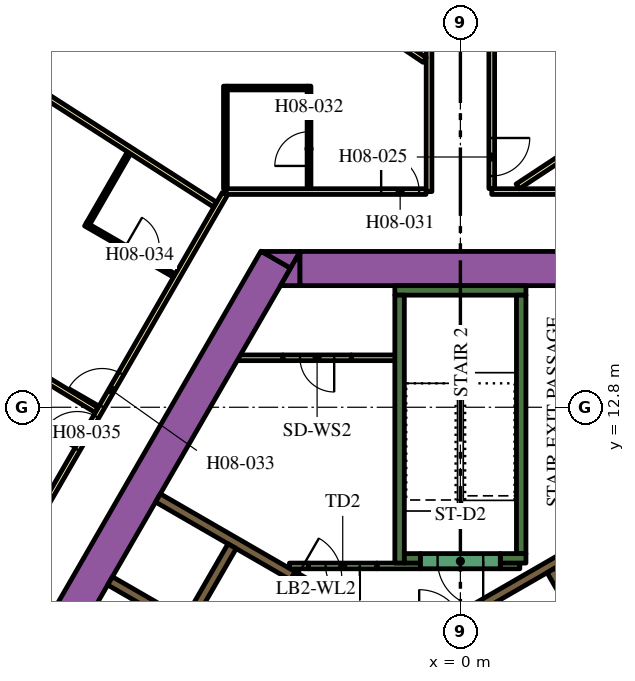
"""IFC4 building model, lengths in metres.
Left out: names, types, materials, properties, quantities, classifications, styles, units other than length and angle.
Written with IfcOpenShell. Run it as: python <this file> out.ifc"""

import sys

from ifc_helpers import new_model, si_unit, direction, frame, frame_2d, origin, place, context, subcontext, project, spatial, polyline, rectangle, outline, extrude, element, fill, save


model = new_model("IFC4")
c1 = context("Model", 3, precision=1e-05, world=origin(), true_north=direction((0.0, 1.0)))
c2 = subcontext(c1, "Body", "Model", "MODEL_VIEW")
j1 = project(units=[si_unit("LENGTHUNIT", "METRE"), si_unit("PLANEANGLEUNIT", "RADIAN")], contexts=[c1])
p1 = place(None, origin())
s1 = spatial("IfcSite", under=j1, at=p1, CompositionType="ELEMENT")
p2 = place(p1, origin())
s2 = spatial("IfcBuilding", under=s1, at=p2, CompositionType="ELEMENT")
p3 = place(p2, frame((0.0, 0.0, 107.1)))
s3 = spatial("IfcBuildingStorey", under=s2, at=p3, CompositionType="ELEMENT", Elevation=107.1)
p4 = place(p3, frame((-15.36, -1.503, 0.0), z_axis=(0.0, 0.0, 1.0), x_axis=(0.50000389221, 0.866023156604, 0.0)))
e1 = element("IfcWall", 1, at=p4, inside=s3, PredefinedType="SOLIDWALL", context=c2, shape_type="SweptSolid", body=[
    extrude(rectangle(XDim=21.0, YDim=0.9, at=frame_2d((10.5, 0.0))), origin(), (0.0, 0.0, 1.0), 3.9),
])
p5 = place(p3, origin())
e2 = element("IfcWall", 2, at=p5, inside=s3, PredefinedType="SOLIDWALL", context=c2, shape_type="SweptSolid", body=[
    extrude(outline(polyline([(-4.215, 16.9), (-4.469, 16.46), (-5.231, 16.9), (-4.215, 16.9)])), origin(), (0.0, 0.0, 1.0), 3.9),
])
p6 = place(p3, frame((-4.224, 16.45, 0.0), z_axis=(0.0, 0.0, 1.0), x_axis=(1.0, 0.0, 0.0)))
e3 = element("IfcWall", 3, at=p6, inside=s3, PredefinedType="SOLIDWALL", context=c2, shape_type="SweptSolid", body=[
    extrude(rectangle(XDim=9.488, YDim=0.9, at=frame_2d((4.744, 0.0))), origin(), (0.0, 0.0, 1.0), 3.9),
])
e4 = element("IfcWall", 4, at=p5, inside=s3, PredefinedType="SOLIDWALL", context=c2, shape_type="SweptSolid", body=[
    extrude(outline(polyline([(-4.734, 16.0), (-4.226, 16.88), (-4.226, 16.0), (-4.734, 16.0)])), origin(), (0.0, 0.0, 1.0), 3.9),
])
p7 = place(p3, frame((-1.725, 15.875, 0.0), z_axis=(0.0, 0.0, 1.0), x_axis=(1.0, 0.0, 0.0)))
e5 = element("IfcWall", 5, at=p7, inside=s3, PredefinedType="SOLIDWALL", context=c2, shape_type="SweptSolid", body=[
    extrude(rectangle(XDim=3.45, YDim=0.25, at=frame_2d((1.725, 0.0))), origin(), (0.0, 0.0, 1.0), 3.9),
])
p8 = place(p3, frame((1.6, 8.95, 0.0), z_axis=(0.0, 0.0, 1.0), x_axis=(0.0, 1.0, 0.0)))
e6 = element("IfcWall", 6, at=p8, inside=s3, PredefinedType="SOLIDWALL", context=c2, shape_type="SweptSolid", body=[
    extrude(rectangle(XDim=6.8, YDim=0.25, at=frame_2d((3.4, 0.0))), origin(), (0.0, 0.0, 1.0), 3.9),
])
p9 = place(p3, frame((1.05, 8.825, 0.0), z_axis=(0.0, 0.0, 1.0), x_axis=(1.0, 0.0, 0.0)))
e7 = element("IfcWall", 7, at=p9, inside=s3, PredefinedType="SOLIDWALL", context=c2, shape_type="SweptSolid", body=[
    extrude(rectangle(XDim=0.675, YDim=0.25, at=frame_2d((0.337, 0.0))), origin(), (0.0, 0.0, 1.0), 3.9),
])
p10 = place(p3, frame((-1.6, 8.7, 0.0), z_axis=(0.0, 0.0, 1.0), x_axis=(0.0, 1.0, 0.0)))
e8 = element("IfcWall", 8, at=p10, inside=s3, PredefinedType="SOLIDWALL", context=c2, shape_type="SweptSolid", body=[
    extrude(rectangle(XDim=7.05, YDim=0.25, at=frame_2d((3.525, 0.0))), origin(), (0.0, 0.0, 1.0), 3.9),
])
p11 = place(p3, frame((-1.475, 8.825, 0.0), z_axis=(0.0, 0.0, 1.0), x_axis=(1.0, 0.0, 0.0)))
e9 = element("IfcWall", 9, at=p11, inside=s3, PredefinedType="SOLIDWALL", context=c2, shape_type="SweptSolid", body=[
    extrude(rectangle(XDim=0.425, YDim=0.25, at=frame_2d((0.212, 0.0))), origin(), (0.0, 0.0, 1.0), 3.9),
])
p12 = place(p3, frame((0.314, 7.456, 0.0), z_axis=(0.0, 0.0, 1.0), x_axis=(0.866013897511, 0.50001992892, 0.0)))
e10 = element("IfcWall", 10, at=p12, inside=s3, PredefinedType="SOLIDWALL", context=c2, shape_type="SweptSolid", body=[
    extrude(rectangle(XDim=3.268, YDim=0.25, at=frame_2d((1.634, 0.0))), origin(), (0.0, 0.0, 1.0), 3.9),
])
e11 = element("IfcWall", 11, at=p5, inside=s3, PredefinedType="SOLIDWALL", context=c2, shape_type="SweptSolid", body=[
    extrude(outline(polyline([(-3.128, 7.481), (-3.259, 7.557), (-3.134, 7.773), (-3.003, 7.698), (-3.128, 7.481)])), origin(), (0.0, 0.0, 1.0), 3.9),
])
p13 = place(p3, frame((-7.314, 7.132, 0.0), z_axis=(0.0, 0.0, 1.0), x_axis=(-0.866008176907, 0.50002983664, 0.0)))
e12 = element("IfcWall", 12, at=p13, inside=s3, PredefinedType="SOLIDWALL", context=c2, shape_type="SweptSolid", body=[
    extrude(rectangle(XDim=2.2, YDim=0.25, at=frame_2d((1.1, 0.0))), origin(), (0.0, 0.0, 1.0), 3.9),
])
p14 = place(p3, frame((-7.959, 10.415, 0.0), z_axis=(0.0, 0.0, 1.0), x_axis=(0.866020958405, -0.500007699544, 0.0)))
e13 = element("IfcWall", 13, at=p14, inside=s3, PredefinedType="SOLIDWALL", context=c2, shape_type="SweptSolid", body=[
    extrude(rectangle(XDim=4.1, YDim=0.25, at=frame_2d((2.05, 0.0))), origin(), (0.0, 0.0, 1.0), 3.9),
])
p15 = place(p3, frame((-3.997, 8.625, 0.0), z_axis=(0.0, 0.0, 1.0), x_axis=(-1.0, 0.0, 0.0)))
e14 = element("IfcWall", 14, at=p15, inside=s3, PredefinedType="PARTITIONING", context=c2, shape_type="SweptSolid", body=[
    extrude(rectangle(XDim=0.502, YDim=0.15, at=frame_2d((0.251, 0.0))), origin(), (0.0, 0.0, 1.0), 2.75),
])
p16 = place(p3, frame((-2.196, 8.625, 0.0), z_axis=(0.0, 0.0, 1.0), x_axis=(1.0, 0.0, 0.0)))
e15 = element("IfcWall", 15, at=p16, inside=s3, PredefinedType="PARTITIONING", context=c2, shape_type="SweptSolid", body=[
    extrude(rectangle(XDim=1.146, YDim=0.15, at=frame_2d((0.573, 0.0))), origin(), (0.0, 0.0, 1.0), 2.75),
])
p17 = place(p3, frame((-5.851, 14.102, 0.0), z_axis=(0.0, 0.0, 1.0), x_axis=(1.0, 0.0, 0.0)))
e16 = element("IfcWall", 16, at=p17, inside=s3, PredefinedType="PARTITIONING", context=c2, shape_type="SweptSolid", body=[
    extrude(rectangle(XDim=1.18, YDim=0.15, at=frame_2d((0.59, 0.0))), origin(), (0.0, 0.0, 1.0), 2.75),
])
p18 = place(p3, frame((-2.871, 14.102, 0.0), z_axis=(0.0, 0.0, 1.0), x_axis=(1.0, 0.0, 0.0)))
e17 = element("IfcWall", 17, at=p18, inside=s3, PredefinedType="PARTITIONING", context=c2, shape_type="SweptSolid", body=[
    extrude(rectangle(XDim=1.196, YDim=0.15, at=frame_2d((0.598, 0.0))), origin(), (0.0, 0.0, 1.0), 2.75),
])
p19 = place(p3, frame((1.05, 8.625, 0.0), z_axis=(0.0, 0.0, 1.0), x_axis=(1.0, 0.0, 0.0)))
e18 = element("IfcWall", 18, at=p19, inside=s3, PredefinedType="PARTITIONING", context=c2, shape_type="SweptSolid", body=[
    extrude(rectangle(XDim=0.514, YDim=0.15, at=frame_2d((0.257, 0.0))), origin(), (0.0, 0.0, 1.0), 2.75),
])
p20 = place(p3, frame((8.565, -2.185, 0.0), z_axis=(0.0, 0.0, 1.0), x_axis=(-0.499997954832, 0.866026584559, 0.0)))
e19 = element("IfcWall", 19, at=p20, inside=s3, PredefinedType="SOLIDWALL", context=c2, shape_type="SweptSolid", body=[
    extrude(rectangle(XDim=12.35, YDim=0.25, at=frame_2d((6.175, 0.0))), origin(), (0.0, 0.0, 1.0), 3.9),
])
p21 = place(p20, frame((5.725, 0.0, 0.0)))
e20 = element("IfcOpeningElement", 20, at=p21, cuts=e19, PredefinedType="OPENING", context=c2, shape_type="SweptSolid", body=[
    extrude(rectangle(XDim=0.9, YDim=2.1, at=frame_2d((0.45, 1.05))), frame((0.0, 0.135, 0.0), z_axis=(0.0, -1.0, 0.0), x_axis=(1.0, 0.0, 0.0)), (0.0, 0.0, 1.0), 0.27),
])
p22 = place(p3, frame((-6.008, 9.144, 0.0), z_axis=(0.0, 0.0, 1.0), x_axis=(-0.500006956611, -0.866021387346, 0.0)))
e21 = element("IfcWall", 21, at=p22, inside=s3, PredefinedType="SOLIDWALL", context=c2, shape_type="SweptSolid", body=[
    extrude(rectangle(XDim=9.83, YDim=0.25, at=frame_2d((4.915, 0.0))), origin(), (0.0, 0.0, 1.0), 3.9),
])
p23 = place(p22, frame((6.985, 0.0, 0.0)))
e22 = element("IfcOpeningElement", 22, at=p23, cuts=e21, PredefinedType="OPENING", context=c2, shape_type="SweptSolid", body=[
    extrude(rectangle(XDim=0.9, YDim=2.1, at=frame_2d((0.45, 1.05))), frame((0.0, 0.135, 0.0), z_axis=(0.0, -1.0, 0.0), x_axis=(1.0, 0.0, 0.0)), (0.0, 0.0, 1.0), 0.27),
])
p24 = place(p3, frame((1.05, 8.75, 0.0), z_axis=(0.0, 0.0, 1.0), x_axis=(-1.0, 0.0, 0.0)))
e23 = element("IfcWall", 23, at=p24, inside=s3, PredefinedType="SOLIDWALL", context=c2, shape_type="SweptSolid", body=[
    extrude(rectangle(XDim=2.1, YDim=0.4, at=frame_2d((1.05, 0.0))), origin(), (0.0, 0.0, 1.0), 3.9),
])
p25 = place(p24, frame((0.45, 0.0, 0.0)))
e24 = element("IfcOpeningElement", 24, at=p25, cuts=e23, PredefinedType="OPENING", context=c2, shape_type="SweptSolid", body=[
    extrude(rectangle(XDim=1.2, YDim=2.1, at=frame_2d((0.6, 1.05))), frame((0.0, 0.21, 0.0), z_axis=(0.0, -1.0, 0.0), x_axis=(1.0, 0.0, 0.0)), (0.0, 0.0, 1.0), 0.42),
])
p26 = place(p3, frame((-2.196, 8.625, 0.0), z_axis=(0.0, 0.0, 1.0), x_axis=(-1.0, 0.0, 0.0)))
e25 = element("IfcWall", 25, at=p26, inside=s3, PredefinedType="PARTITIONING", context=c2, shape_type="SweptSolid", body=[
    extrude(rectangle(XDim=1.8, YDim=0.15, at=frame_2d((0.9, 0.0))), origin(), (0.0, 0.0, 1.0), 2.75),
])
p27 = place(p26, frame((0.45, 0.0, 0.0)))
e26 = element("IfcOpeningElement", 26, at=p27, cuts=e25, PredefinedType="OPENING", context=c2, shape_type="SweptSolid", body=[
    extrude(rectangle(XDim=0.9, YDim=2.1, at=frame_2d((0.45, 1.05))), frame((0.0, 0.085, 0.0), z_axis=(0.0, -1.0, 0.0), x_axis=(1.0, 0.0, 0.0)), (0.0, 0.0, 1.0), 0.17),
])
p28 = place(p3, frame((-4.409, 8.365, 0.0), z_axis=(0.0, 0.0, 1.0), x_axis=(0.866034573852, -0.49998411664, 0.0)))
e27 = element("IfcWall", 27, at=p28, inside=s3, PredefinedType="SOLIDWALL", context=c2, shape_type="SweptSolid", body=[
    extrude(rectangle(XDim=1.4, YDim=0.25, at=frame_2d((0.7, 0.0))), origin(), (0.0, 0.0, 1.0), 3.9),
])
p29 = place(p28, frame((0.1, 0.0, 0.0)))
e28 = element("IfcOpeningElement", 28, at=p29, cuts=e27, PredefinedType="OPENING", context=c2, shape_type="SweptSolid", body=[
    extrude(rectangle(XDim=1.2, YDim=2.1, at=frame_2d((0.6, 1.05))), frame((0.0, 0.135, 0.0), z_axis=(0.0, -1.0, 0.0), x_axis=(1.0, 0.0, 0.0)), (0.0, 0.0, 1.0), 0.27),
])
p30 = place(p3, frame((-2.871, 14.102, 0.0), z_axis=(0.0, 0.0, 1.0), x_axis=(-1.0, 0.0, 0.0)))
e29 = element("IfcWall", 29, at=p30, inside=s3, PredefinedType="PARTITIONING", context=c2, shape_type="SweptSolid", body=[
    extrude(rectangle(XDim=1.8, YDim=0.15, at=frame_2d((0.9, 0.0))), origin(), (0.0, 0.0, 1.0), 2.75),
])
p31 = place(p30, frame((0.45, 0.0, 0.0)))
e30 = element("IfcOpeningElement", 30, at=p31, cuts=e29, PredefinedType="OPENING", context=c2, shape_type="SweptSolid", body=[
    extrude(rectangle(XDim=0.9, YDim=2.1, at=frame_2d((0.45, 1.05))), frame((0.0, 0.085, 0.0), z_axis=(0.0, -1.0, 0.0), x_axis=(1.0, 0.0, 0.0)), (0.0, 0.0, 1.0), 0.17),
])
p32 = place(p3, frame((0.825, 18.475, 0.0), z_axis=(0.0, 0.0, 1.0), x_axis=(1.0, 0.0, 0.0)))
e31 = element("IfcWall", 31, at=p32, inside=s3, PredefinedType="PARTITIONING", context=c2, shape_type="SweptSolid", body=[
    extrude(rectangle(XDim=5.268, YDim=0.15, at=frame_2d((2.634, 0.0))), origin(), (0.0, 0.0, 1.0), 2.75),
])
p33 = place(p3, frame((0.825, 32.098, 0.0), z_axis=(0.0, 0.0, 1.0), x_axis=(0.0, -1.0, 0.0)))
e32 = element("IfcWall", 32, at=p33, inside=s3, PredefinedType="PARTITIONING", context=c2, shape_type="SweptSolid", body=[
    extrude(rectangle(XDim=13.543, YDim=0.15, at=frame_2d((6.772, 0.0))), origin(), (0.0, 0.0, 1.0), 2.75),
])
p34 = place(p33, frame((12.213, 0.0, 0.0)))
e33 = element("IfcOpeningElement", 33, at=p34, cuts=e32, PredefinedType="OPENING", context=c2, shape_type="SweptSolid", body=[
    extrude(rectangle(XDim=1.0, YDim=2.1, at=frame_2d((0.5, 1.05))), frame((0.0, 0.085, 0.0), z_axis=(0.0, -1.0, 0.0), x_axis=(1.0, 0.0, 0.0)), (0.0, 0.0, 1.0), 0.17),
])
p35 = place(p33, frame((4.65, 0.0, 0.0)))
e34 = element("IfcOpeningElement", 34, at=p35, cuts=e32, PredefinedType="OPENING", context=c2, shape_type="SweptSolid", body=[
    extrude(rectangle(XDim=1.0, YDim=2.1, at=frame_2d((0.5, 1.05))), frame((0.0, 0.085, 0.0), z_axis=(0.0, -1.0, 0.0), x_axis=(1.0, 0.0, 0.0)), (0.0, 0.0, 1.0), 0.17),
])
p36 = place(p3, frame((-0.825, 18.475, 0.0), z_axis=(0.0, 0.0, 1.0), x_axis=(0.0, 1.0, 0.0)))
e35 = element("IfcWall", 35, at=p36, inside=s3, PredefinedType="PARTITIONING", context=c2, shape_type="SweptSolid", body=[
    extrude(rectangle(XDim=13.623, YDim=0.15, at=frame_2d((6.812, 0.0))), origin(), (0.0, 0.0, 1.0), 2.75),
])
p37 = place(p36, frame((4.135, 0.0, 0.0)))
e36 = element("IfcOpeningElement", 36, at=p37, cuts=e35, PredefinedType="OPENING", context=c2, shape_type="SweptSolid", body=[
    extrude(rectangle(XDim=1.1, YDim=2.1, at=frame_2d((0.55, 1.05))), frame((0.0, 0.085, 0.0), z_axis=(0.0, -1.0, 0.0), x_axis=(1.0, 0.0, 0.0)), (0.0, 0.0, 1.0), 0.17),
])
p38 = place(p3, frame((-6.163, 18.475, 0.0), z_axis=(0.0, 0.0, 1.0), x_axis=(1.0, 0.0, 0.0)))
e37 = element("IfcWall", 37, at=p38, inside=s3, PredefinedType="PARTITIONING", context=c2, shape_type="SweptSolid", body=[
    extrude(rectangle(XDim=5.258, YDim=0.15, at=frame_2d((2.629, 0.0))), origin(), (0.0, 0.0, 1.0), 2.75),
])
p39 = place(p38, frame((4.078, 0.0, 0.0)))
e38 = element("IfcOpeningElement", 38, at=p39, cuts=e37, PredefinedType="OPENING", context=c2, shape_type="SweptSolid", body=[
    extrude(rectangle(XDim=1.0, YDim=2.1, at=frame_2d((0.5, 1.05))), frame((0.0, 0.085, 0.0), z_axis=(0.0, -1.0, 0.0), x_axis=(1.0, 0.0, 0.0)), (0.0, 0.0, 1.0), 0.17),
])
p40 = place(p3, frame((-19.081, -3.9, 0.0), z_axis=(0.0, 0.0, 1.0), x_axis=(0.499998313975, 0.866026377209, 0.0)))
e39 = element("IfcWall", 39, at=p40, inside=s3, PredefinedType="PARTITIONING", context=c2, shape_type="SweptSolid", body=[
    extrude(rectangle(XDim=25.766, YDim=0.15, at=frame_2d((12.883, 0.0))), origin(), (0.0, 0.0, 1.0), 2.75),
])
p41 = place(p40, frame((19.306, 0.0, 0.0)))
e40 = element("IfcOpeningElement", 40, at=p41, cuts=e39, PredefinedType="OPENING", context=c2, shape_type="SweptSolid", body=[
    extrude(rectangle(XDim=1.0, YDim=2.1, at=frame_2d((0.5, 1.05))), frame((0.0, 0.085, 0.0), z_axis=(0.0, -1.0, 0.0), x_axis=(1.0, 0.0, 0.0)), (0.0, 0.0, 1.0), 0.17),
])
p42 = place(p40, frame((18.0, 0.0, 0.0)))
e41 = element("IfcOpeningElement", 41, at=p42, cuts=e39, PredefinedType="OPENING", context=c2, shape_type="SweptSolid", body=[
    extrude(rectangle(XDim=1.0, YDim=2.1, at=frame_2d((0.5, 1.05))), frame((0.0, 0.085, 0.0), z_axis=(0.0, -1.0, 0.0), x_axis=(1.0, 0.0, 0.0)), (0.0, 0.0, 1.0), 0.17),
])
p43 = place(p40, frame((6.838, 0.0, 0.0)))
e42 = element("IfcOpeningElement", 42, at=p43, cuts=e39, PredefinedType="OPENING", context=c2, shape_type="SweptSolid", body=[
    extrude(rectangle(XDim=1.0, YDim=2.1, at=frame_2d((0.5, 1.05))), frame((0.0, 0.085, 0.0), z_axis=(0.0, -1.0, 0.0), x_axis=(1.0, 0.0, 0.0)), (0.0, 0.0, 1.0), 0.17),
])
p44 = place(p40, frame((4.674, 0.0, 0.0)))
e43 = element("IfcOpeningElement", 43, at=p44, cuts=e39, PredefinedType="OPENING", context=c2, shape_type="SweptSolid", body=[
    extrude(rectangle(XDim=0.9, YDim=2.1, at=frame_2d((0.45, 1.05))), frame((0.0, 0.085, 0.0), z_axis=(0.0, -1.0, 0.0), x_axis=(1.0, 0.0, 0.0)), (0.0, 0.0, 1.0), 0.17),
])
p45 = place(p40, frame((0.18, 0.0, 0.0)))
e44 = element("IfcOpeningElement", 44, at=p45, cuts=e39, PredefinedType="OPENING", context=c2, shape_type="SweptSolid", body=[
    extrude(rectangle(XDim=1.0, YDim=2.1, at=frame_2d((0.5, 1.05))), frame((0.0, 0.085, 0.0), z_axis=(0.0, -1.0, 0.0), x_axis=(1.0, 0.0, 0.0)), (0.0, 0.0, 1.0), 0.17),
])
p46 = place(p3, frame((-15.225, 16.167, 0.0), z_axis=(0.0, 0.0, 1.0), x_axis=(0.854088713274, -0.520127359266, 0.0)))
e45 = element("IfcWall", 45, at=p46, inside=s3, PredefinedType="PARTITIONING", context=c2, shape_type="SweptSolid", body=[
    extrude(rectangle(XDim=6.611, YDim=0.15, at=frame_2d((3.305, 0.0))), origin(), (0.0, 0.0, 1.0), 2.75),
])
p47 = place(p3, frame((-11.838, 21.585, 0.0), z_axis=(0.0, 0.0, 1.0), x_axis=(0.841699322813, -0.539946525108, 0.0)))
e46 = element("IfcWall", 46, at=p47, inside=s3, PredefinedType="PARTITIONING", context=c2, shape_type="SweptSolid", body=[
    extrude(rectangle(XDim=6.392, YDim=0.15, at=frame_2d((3.196, 0.0))), origin(), (0.0, 0.0, 1.0), 2.75),
])
p48 = place(p3, frame((-8.326, 26.923, 0.0), z_axis=(0.0, 0.0, 1.0), x_axis=(0.828836601893, -0.5594907393, 0.0)))
e47 = element("IfcWall", 47, at=p48, inside=s3, PredefinedType="PARTITIONING", context=c2, shape_type="SweptSolid", body=[
    extrude(rectangle(XDim=8.909, YDim=0.15, at=frame_2d((4.455, 0.0))), origin(), (0.0, 0.0, 1.0), 2.75),
])
p49 = place(p3, frame((10.592, 24.589, 0.0), z_axis=(0.0, 0.0, 1.0), x_axis=(-0.835337323748, -0.549737715236, 0.0)))
e48 = element("IfcWall", 48, at=p49, inside=s3, PredefinedType="PARTITIONING", context=c2, shape_type="SweptSolid", body=[
    extrude(rectangle(XDim=10.875, YDim=0.15, at=frame_2d((5.438, 0.0))), origin(), (0.0, 0.0, 1.0), 2.75),
])
p50 = place(p3, frame((-3.983, 18.55, 0.0), z_axis=(0.0, 0.0, 1.0), x_axis=(0.0, 1.0, 0.0)))
e49 = element("IfcWall", 49, at=p50, inside=s3, PredefinedType="PARTITIONING", context=c2, shape_type="SweptSolid", body=[
    extrude(rectangle(XDim=2.7, YDim=0.1, at=frame_2d((1.35, 0.0))), origin(), (0.0, 0.0, 1.0), 2.75),
])
p51 = place(p50, frame((0.6, 0.0, 0.0)))
e50 = element("IfcOpeningElement", 50, at=p51, cuts=e49, PredefinedType="OPENING", context=c2, shape_type="SweptSolid", body=[
    extrude(rectangle(XDim=0.9, YDim=2.1, at=frame_2d((0.45, 1.05))), frame((0.0, 0.06, 0.0), z_axis=(0.0, -1.0, 0.0), x_axis=(1.0, 0.0, 0.0)), (0.0, 0.0, 1.0), 0.12),
])
p52 = place(p3, frame((-4.033, 21.2, 0.0), z_axis=(0.0, 0.0, 1.0), x_axis=(-1.0, 0.0, 0.0)))
e51 = element("IfcWall", 51, at=p52, inside=s3, PredefinedType="PARTITIONING", context=c2, shape_type="SweptSolid", body=[
    extrude(rectangle(XDim=2.1, YDim=0.1, at=frame_2d((1.05, 0.0))), origin(), (0.0, 0.0, 1.0), 2.75),
])
p53 = place(p3, frame((-6.183, 18.55, 0.0), z_axis=(0.0, 0.0, 1.0), x_axis=(0.0, 1.0, 0.0)))
e52 = element("IfcWall", 52, at=p53, inside=s3, PredefinedType="PARTITIONING", context=c2, shape_type="SweptSolid", body=[
    extrude(rectangle(XDim=2.7, YDim=0.1, at=frame_2d((1.35, 0.0))), origin(), (0.0, 0.0, 1.0), 2.75),
])
p54 = place(p3, frame((-9.864, 17.615, 0.0), z_axis=(0.0, 0.0, 1.0), x_axis=(0.866019956843, -0.50000943426, 0.0)))
e53 = element("IfcWall", 53, at=p54, inside=s3, PredefinedType="PARTITIONING", context=c2, shape_type="SweptSolid", body=[
    extrude(rectangle(XDim=2.7, YDim=0.1, at=frame_2d((1.35, 0.0))), origin(), (0.0, 0.0, 1.0), 2.75),
])
p55 = place(p54, frame((1.2, 0.0, 0.0)))
e54 = element("IfcOpeningElement", 54, at=p55, cuts=e53, PredefinedType="OPENING", context=c2, shape_type="SweptSolid", body=[
    extrude(rectangle(XDim=0.9, YDim=2.1, at=frame_2d((0.45, 1.05))), frame((0.0, 0.06, 0.0), z_axis=(0.0, -1.0, 0.0), x_axis=(1.0, 0.0, 0.0)), (0.0, 0.0, 1.0), 0.12),
])
p56 = place(p3, frame((-9.796, 17.633, 0.0), z_axis=(0.0, 0.0, 1.0), x_axis=(0.499961633463, 0.866047553582, 0.0)))
e55 = element("IfcWall", 55, at=p56, inside=s3, PredefinedType="PARTITIONING", context=c2, shape_type="SweptSolid", body=[
    extrude(rectangle(XDim=2.15, YDim=0.1, at=frame_2d((1.075, 0.0))), origin(), (0.0, 0.0, 1.0), 2.75),
])
p57 = place(p25, origin())
e56 = element("IfcDoor", 56, at=p57, inside=s3, OperationType="SINGLE_SWING_LEFT", PredefinedType="DOOR", context=c2, shape_type="SweptSolid", body=[
    extrude(rectangle(XDim=1.2, YDim=2.1, at=frame_2d((0.6, 1.05))), frame((0.0, 0.025, 0.0), z_axis=(0.0, -1.0, 0.0), x_axis=(1.0, 0.0, 0.0)), (0.0, 0.0, 1.0), 0.05),
])
fill(e24, e56)
p58 = place(p27, origin())
e57 = element("IfcDoor", 57, at=p58, inside=s3, OperationType="SINGLE_SWING_LEFT", PredefinedType="DOOR", context=c2, shape_type="SweptSolid", body=[
    extrude(rectangle(XDim=0.9, YDim=2.1, at=frame_2d((0.45, 1.05))), frame((0.0, 0.025, 0.0), z_axis=(0.0, -1.0, 0.0), x_axis=(1.0, 0.0, 0.0)), (0.0, 0.0, 1.0), 0.05),
])
fill(e26, e57)
p59 = place(p29, origin())
e58 = element("IfcDoor", 58, at=p59, inside=s3, OperationType="SINGLE_SWING_LEFT", PredefinedType="DOOR", context=c2, shape_type="SweptSolid", body=[
    extrude(rectangle(XDim=1.2, YDim=2.1, at=frame_2d((0.6, 1.05))), frame((0.0, 0.025, 0.0), z_axis=(0.0, -1.0, 0.0), x_axis=(1.0, 0.0, 0.0)), (0.0, 0.0, 1.0), 0.05),
])
fill(e28, e58)
p60 = place(p31, origin())
e59 = element("IfcDoor", 59, at=p60, inside=s3, OperationType="SINGLE_SWING_LEFT", PredefinedType="DOOR", context=c2, shape_type="SweptSolid", body=[
    extrude(rectangle(XDim=0.9, YDim=2.1, at=frame_2d((0.45, 1.05))), frame((0.0, 0.025, 0.0), z_axis=(0.0, -1.0, 0.0), x_axis=(1.0, 0.0, 0.0)), (0.0, 0.0, 1.0), 0.05),
])
fill(e30, e59)
p61 = place(p34, origin())
e60 = element("IfcDoor", 60, at=p61, inside=s3, OperationType="SINGLE_SWING_RIGHT", PredefinedType="DOOR", context=c2, shape_type="SweptSolid", body=[
    extrude(rectangle(XDim=1.0, YDim=2.1, at=frame_2d((0.5, 1.05))), frame((0.0, 0.025, 0.0), z_axis=(0.0, -1.0, 0.0), x_axis=(1.0, 0.0, 0.0)), (0.0, 0.0, 1.0), 0.05),
])
fill(e33, e60)
p62 = place(p39, origin())
e61 = element("IfcDoor", 61, at=p62, inside=s3, OperationType="SINGLE_SWING_RIGHT", PredefinedType="DOOR", context=c2, shape_type="SweptSolid", body=[
    extrude(rectangle(XDim=1.0, YDim=2.1, at=frame_2d((0.5, 1.05))), frame((0.0, 0.025, 0.0), z_axis=(0.0, -1.0, 0.0), x_axis=(1.0, 0.0, 0.0)), (0.0, 0.0, 1.0), 0.05),
])
fill(e38, e61)
p63 = place(p51, origin())
e62 = element("IfcDoor", 62, at=p63, inside=s3, OperationType="SINGLE_SWING_RIGHT", PredefinedType="DOOR", context=c2, shape_type="SweptSolid", body=[
    extrude(rectangle(XDim=0.9, YDim=2.1, at=frame_2d((0.45, 1.05))), frame((0.0, 0.025, 0.0), z_axis=(0.0, -1.0, 0.0), x_axis=(1.0, 0.0, 0.0)), (0.0, 0.0, 1.0), 0.05),
])
fill(e50, e62)
p64 = place(p41, origin())
e63 = element("IfcDoor", 63, at=p64, inside=s3, OperationType="SINGLE_SWING_LEFT", PredefinedType="DOOR", context=c2, shape_type="SweptSolid", body=[
    extrude(rectangle(XDim=1.0, YDim=2.1, at=frame_2d((0.5, 1.05))), frame((0.0, 0.025, 0.0), z_axis=(0.0, -1.0, 0.0), x_axis=(1.0, 0.0, 0.0)), (0.0, 0.0, 1.0), 0.05),
])
fill(e40, e63)
p65 = place(p55, origin())
e64 = element("IfcDoor", 64, at=p65, inside=s3, OperationType="SINGLE_SWING_LEFT", PredefinedType="DOOR", context=c2, shape_type="SweptSolid", body=[
    extrude(rectangle(XDim=0.9, YDim=2.1, at=frame_2d((0.45, 1.05))), frame((0.0, 0.025, 0.0), z_axis=(0.0, -1.0, 0.0), x_axis=(1.0, 0.0, 0.0)), (0.0, 0.0, 1.0), 0.05),
])
fill(e54, e64)
p66 = place(p42, origin())
e65 = element("IfcDoor", 65, at=p66, inside=s3, OperationType="SINGLE_SWING_RIGHT", PredefinedType="DOOR", context=c2, shape_type="SweptSolid", body=[
    extrude(rectangle(XDim=1.0, YDim=2.1, at=frame_2d((0.5, 1.05))), frame((0.0, 0.025, 0.0), z_axis=(0.0, -1.0, 0.0), x_axis=(1.0, 0.0, 0.0)), (0.0, 0.0, 1.0), 0.05),
])
fill(e41, e65)
save(model, sys.argv[1])
